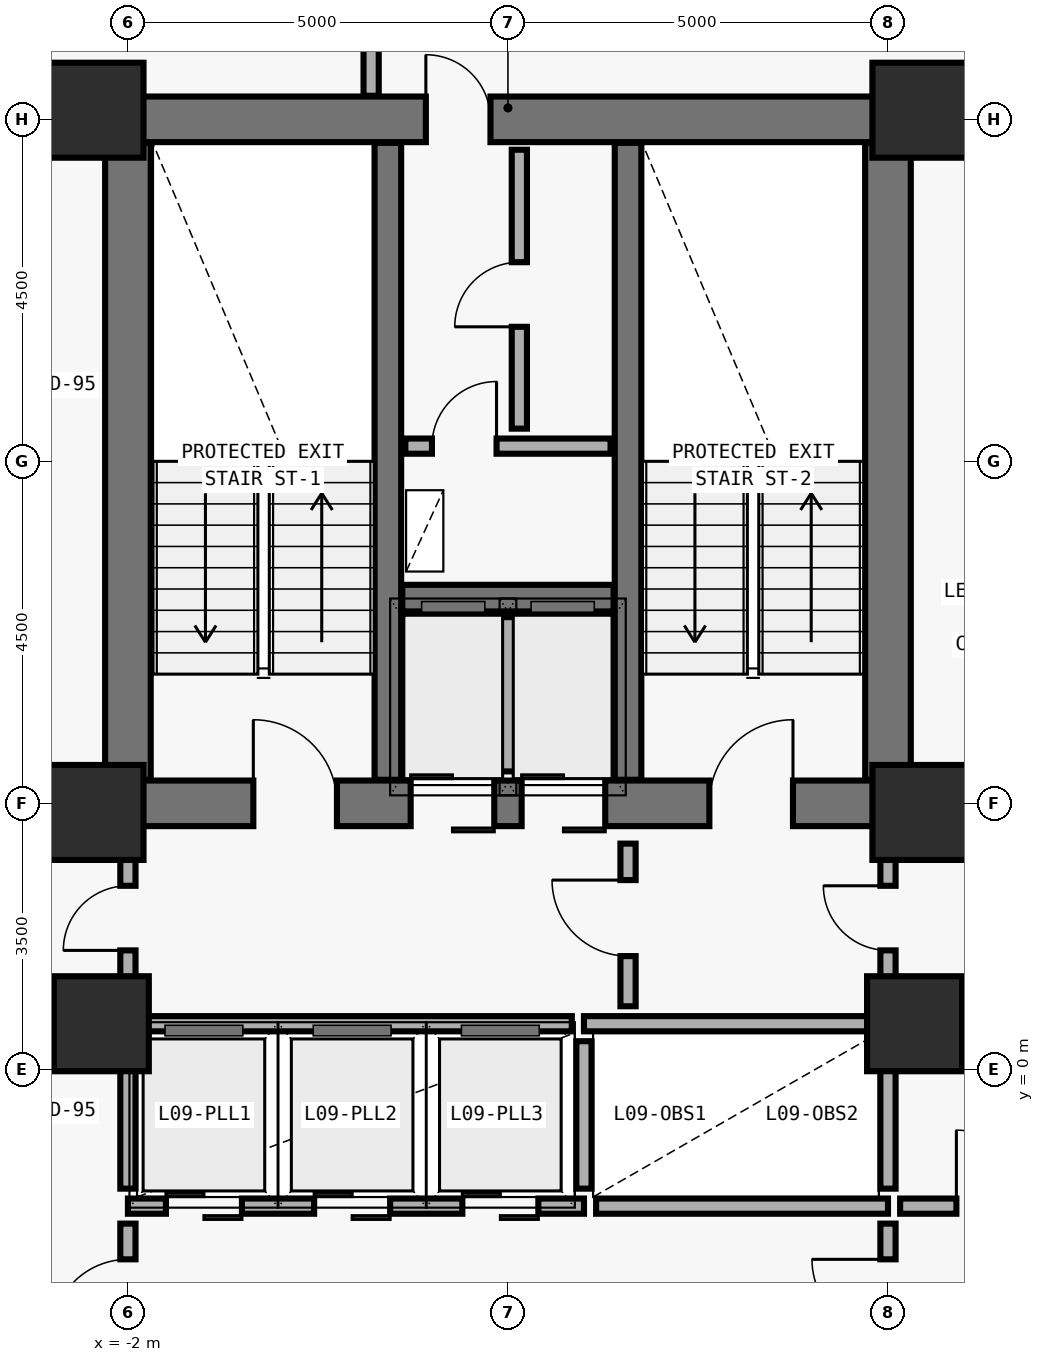
"""IFC4 building model, lengths in metres.
Left out: names, types, materials, properties, quantities, classifications, styles, units other than length and angle.
Written with IfcOpenShell. Run it as: python <this file> out.ifc"""

import sys

from ifc_helpers import new_model, si_unit, direction, frame, frame_2d, origin, origin_2d, place, context, subcontext, project, spatial, rectangle, extrude, element, fill, save


model = new_model("IFC4")
c1 = context("Model", 3, precision=1e-05, world=origin(), true_north=direction((0.0, 1.0)))
c2 = subcontext(c1, "Body", "Model", "MODEL_VIEW")
j1 = project(units=[si_unit("LENGTHUNIT", "METRE"), si_unit("PLANEANGLEUNIT", "RADIAN")], contexts=[c1])
p1 = place(None, origin())
s1 = spatial("IfcSite", under=j1, at=p1, CompositionType="ELEMENT")
p2 = place(p1, origin())
s2 = spatial("IfcBuilding", under=s1, at=p2, CompositionType="ELEMENT")
p3 = place(p2, frame((0.0, 0.0, 39.3)))
s3 = spatial("IfcBuildingStorey", under=s2, at=p3, CompositionType="ELEMENT", Elevation=39.3)
p4 = place(p3, frame((-2.0, 3.5, 0.0), z_axis=(0.0, 0.0, 1.0), x_axis=(1.0, 0.0, 0.0)))
e1 = element("IfcWall", 1, at=p4, inside=s3, PredefinedType="SHEAR", context=c2, shape_type="SweptSolid", body=[
    extrude(rectangle(XDim=10.0, YDim=0.6, at=frame_2d((5.0, 0.0))), origin(), (0.0, 0.0, 1.0), 3.892),
])
p5 = place(p4, frame((1.65, 0.0, 0.0)))
e2 = element("IfcOpeningElement", 2, at=p5, cuts=e1, PredefinedType="OPENING", context=c2, shape_type="SweptSolid", body=[
    extrude(rectangle(XDim=1.1, YDim=2.15, at=frame_2d((0.55, 1.075))), frame((0.0, 0.31, 0.0), z_axis=(0.0, -1.0, 0.0), x_axis=(1.0, 0.0, 0.0)), (0.0, 0.0, 1.0), 0.62),
])
p6 = place(p4, frame((7.65, 0.0, 0.0)))
e3 = element("IfcOpeningElement", 3, at=p6, cuts=e1, PredefinedType="OPENING", context=c2, shape_type="SweptSolid", body=[
    extrude(rectangle(XDim=1.1, YDim=2.15, at=frame_2d((0.55, 1.075))), frame((0.0, 0.31, 0.0), z_axis=(0.0, -1.0, 0.0), x_axis=(1.0, 0.0, 0.0)), (0.0, 0.0, 1.0), 0.62),
])
p7 = place(p4, frame((3.72, 0.0, 0.0)))
e4 = element("IfcOpeningElement", 4, at=p7, cuts=e1, PredefinedType="OPENING", context=c2, shape_type="SweptSolid", body=[
    extrude(rectangle(XDim=1.1, YDim=2.2, at=frame_2d((0.55, 1.1))), frame((0.0, 0.31, 0.0), z_axis=(0.0, -1.0, 0.0), x_axis=(1.0, 0.0, 0.0)), (0.0, 0.0, 1.0), 0.62),
])
p8 = place(p4, frame((5.18, 0.0, 0.0)))
e5 = element("IfcOpeningElement", 5, at=p8, cuts=e1, PredefinedType="OPENING", context=c2, shape_type="SweptSolid", body=[
    extrude(rectangle(XDim=1.1, YDim=2.2, at=frame_2d((0.55, 1.1))), frame((0.0, 0.31, 0.0), z_axis=(0.0, -1.0, 0.0), x_axis=(1.0, 0.0, 0.0)), (0.0, 0.0, 1.0), 0.62),
])
p9 = place(p3, frame((-2.0, 12.5, 0.0), z_axis=(0.0, 0.0, 1.0), x_axis=(1.0, 0.0, 0.0)))
e6 = element("IfcWall", 6, at=p9, inside=s3, PredefinedType="SHEAR", context=c2, shape_type="SweptSolid", body=[
    extrude(rectangle(XDim=10.0, YDim=0.6, at=frame_2d((5.0, 0.0))), origin(), (0.0, 0.0, 1.0), 3.892),
])
p10 = place(p9, frame((3.92, 0.0, 0.0)))
e7 = element("IfcOpeningElement", 7, at=p10, cuts=e6, PredefinedType="OPENING", context=c2, shape_type="SweptSolid", body=[
    extrude(rectangle(XDim=0.85, YDim=2.1, at=frame_2d((0.425, 1.05))), frame((0.0, 0.31, 0.0), z_axis=(0.0, -1.0, 0.0), x_axis=(1.0, 0.0, 0.0)), (0.0, 0.0, 1.0), 0.62),
])
for number, where, z_axis, x_axis in (
    (8, (-2.0, 3.81, 0.0), (0.0, 0.0, 1.0), (0.0, 1.0, 0.0)),
    (9, (8.0, 3.81, 0.0), (0.0, 0.0, 1.0), (0.0, 1.0, 0.0)),
):
    element("IfcWall", number, at=place(p3, frame(where, z_axis=z_axis, x_axis=x_axis)), inside=s3, PredefinedType="SHEAR", context=c2, shape_type="SweptSolid", body=[
        extrude(rectangle(XDim=8.38, YDim=0.6, at=frame_2d((4.19, 0.0))), origin(), (0.0, 0.0, 1.0), 3.892),
    ])
for number, where, z_axis, x_axis in (
    (10, (1.42, 3.81, 0.0), (0.0, 0.0, 1.0), (0.0, 1.0, 0.0)),
    (11, (4.58, 3.81, 0.0), (0.0, 0.0, 1.0), (0.0, 1.0, 0.0)),
):
    element("IfcWall", number, at=place(p3, frame(where, z_axis=z_axis, x_axis=x_axis)), inside=s3, PredefinedType="SHEAR", context=c2, shape_type="SweptSolid", body=[
        extrude(rectangle(XDim=8.38, YDim=0.35, at=frame_2d((4.19, 0.0))), origin(), (0.0, 0.0, 1.0), 3.892),
    ])
p11 = place(p3, frame((1.61, 6.2, 0.0), z_axis=(0.0, 0.0, 1.0), x_axis=(1.0, 0.0, 0.0)))
e12 = element("IfcWall", 12, at=p11, inside=s3, PredefinedType="SHEAR", context=c2, shape_type="SweptSolid", body=[
    extrude(rectangle(XDim=2.78, YDim=0.35, at=frame_2d((1.39, 0.0))), origin(), (0.0, 0.0, 1.0), 3.892),
])
for number, where, z_axis, x_axis in (
    (13, (-2.42, 12.62, 0.0), (0.0, 0.0, 1.0), (1.0, 0.0, 0.0)),
    (14, (8.42, 12.62, 0.0), (0.0, 0.0, 1.0), (1.0, 0.0, 0.0)),
    (15, (-2.42, 3.38, 0.0), (0.0, 0.0, 1.0), (1.0, 0.0, 0.0)),
    (16, (8.42, 3.38, 0.0), (0.0, 0.0, 1.0), (1.0, 0.0, 0.0)),
    (17, (-2.35, 0.6, 0.0), (0.0, 0.0, 1.0), (1.0, 0.0, 0.0)),
    (18, (8.35, 0.6, 0.0), (0.0, 0.0, 1.0), (1.0, 0.0, 0.0)),
):
    element("IfcColumn", number, at=place(p3, frame(where, z_axis=z_axis, x_axis=x_axis)), inside=s3, PredefinedType="COLUMN", context=c2, shape_type="SweptSolid", body=[
        extrude(rectangle(XDim=1.25, YDim=1.25, at=origin_2d()), origin(), (0.0, 0.0, 1.0), 3.875),
    ])
p12 = place(p3, frame((3.0, 3.92, 0.0), z_axis=(0.0, 0.0, 1.0), x_axis=(0.0, 1.0, 0.0)))
e19 = element("IfcWall", 19, at=p12, inside=s3, PredefinedType="SOLIDWALL", context=c2, shape_type="SweptSolid", body=[
    extrude(rectangle(XDim=2.03, YDim=0.2, at=frame_2d((1.015, 0.0))), origin(), (0.0, 0.0, 1.0), 3.64),
])
p13 = place(p3, frame((4.0, 0.6, 0.0), z_axis=(0.0, 0.0, 1.0), x_axis=(1.0, 0.0, 0.0)))
e20 = element("IfcWall", 20, at=p13, inside=s3, PredefinedType="SOLIDWALL", context=c2, shape_type="SweptSolid", body=[
    extrude(rectangle(XDim=3.88, YDim=0.2, at=frame_2d((1.94, 0.0))), origin(), (0.0, 0.0, 1.0), 3.122),
])
p14 = place(p3, frame((-2.0, -1.8, 0.0), z_axis=(0.0, 0.0, 1.0), x_axis=(1.0, 0.0, 0.0)))
e21 = element("IfcWall", 21, at=p14, inside=s3, PredefinedType="SOLIDWALL", context=c2, shape_type="SweptSolid", body=[
    extrude(rectangle(XDim=6.0, YDim=0.2, at=frame_2d((3.0, 0.0))), origin(), (0.0, 0.0, 1.0), 3.64),
])
p15 = place(p14, frame((0.5, 0.0, 0.0)))
e22 = element("IfcOpeningElement", 22, at=p15, cuts=e21, PredefinedType="OPENING", context=c2, shape_type="SweptSolid", body=[
    extrude(rectangle(XDim=1.0, YDim=2.2, at=frame_2d((0.5, 1.1))), frame((0.0, 0.11, 0.0), z_axis=(0.0, -1.0, 0.0), x_axis=(1.0, 0.0, 0.0)), (0.0, 0.0, 1.0), 0.22),
])
p16 = place(p14, frame((2.45, 0.0, 0.0)))
e23 = element("IfcOpeningElement", 23, at=p16, cuts=e21, PredefinedType="OPENING", context=c2, shape_type="SweptSolid", body=[
    extrude(rectangle(XDim=1.0, YDim=2.2, at=frame_2d((0.5, 1.1))), frame((0.0, 0.11, 0.0), z_axis=(0.0, -1.0, 0.0), x_axis=(1.0, 0.0, 0.0)), (0.0, 0.0, 1.0), 0.22),
])
p17 = place(p14, frame((4.4, 0.0, 0.0)))
e24 = element("IfcOpeningElement", 24, at=p17, cuts=e21, PredefinedType="OPENING", context=c2, shape_type="SweptSolid", body=[
    extrude(rectangle(XDim=1.0, YDim=2.2, at=frame_2d((0.5, 1.1))), frame((0.0, 0.11, 0.0), z_axis=(0.0, -1.0, 0.0), x_axis=(1.0, 0.0, 0.0)), (0.0, 0.0, 1.0), 0.22),
])
p18 = place(p3, frame((-2.0, -1.57, 0.0), z_axis=(0.0, 0.0, 1.0), x_axis=(0.0, 1.0, 0.0)))
e25 = element("IfcWall", 25, at=p18, inside=s3, PredefinedType="SOLIDWALL", context=c2, shape_type="SweptSolid", body=[
    extrude(rectangle(XDim=2.05, YDim=0.2, at=frame_2d((1.025, 0.0))), origin(), (0.0, 0.0, 1.0), 3.022),
])
p19 = place(p3, frame((4.16, -1.8, 0.0), z_axis=(0.0, 0.0, 1.0), x_axis=(1.0, 0.0, 0.0)))
e26 = element("IfcWall", 26, at=p19, inside=s3, PredefinedType="SOLIDWALL", context=c2, shape_type="SweptSolid", body=[
    extrude(rectangle(XDim=3.84, YDim=0.2, at=frame_2d((1.92, 0.0))), origin(), (0.0, 0.0, 1.0), 3.64),
])
p20 = place(p3, frame((4.0, -1.57, 0.0), z_axis=(0.0, 0.0, 1.0), x_axis=(0.0, 1.0, 0.0)))
e27 = element("IfcWall", 27, at=p20, inside=s3, PredefinedType="SOLIDWALL", context=c2, shape_type="SweptSolid", body=[
    extrude(rectangle(XDim=1.94, YDim=0.2, at=frame_2d((0.97, 0.0))), origin(), (0.0, 0.0, 1.0), 3.64),
])
p21 = place(p3, frame((8.0, -1.57, 0.0), z_axis=(0.0, 0.0, 1.0), x_axis=(0.0, 1.0, 0.0)))
e28 = element("IfcWall", 28, at=p21, inside=s3, PredefinedType="SOLIDWALL", context=c2, shape_type="SweptSolid", body=[
    extrude(rectangle(XDim=2.05, YDim=0.2, at=frame_2d((1.025, 0.0))), origin(), (0.0, 0.0, 1.0), 3.072),
])
p22 = place(p3, frame((1.65, 8.2, 0.0), z_axis=(0.0, 0.0, 1.0), x_axis=(1.0, 0.0, 0.0)))
e29 = element("IfcWall", 29, at=p22, inside=s3, PredefinedType="MOVABLE", context=c2, shape_type="SweptSolid", body=[
    extrude(rectangle(XDim=2.7, YDim=0.2, at=frame_2d((1.35, 0.0))), origin(), (0.0, 0.0, 1.0), 3.64),
])
p23 = place(p22, frame((0.35, 0.0, 0.0)))
e30 = element("IfcOpeningElement", 30, at=p23, cuts=e29, PredefinedType="OPENING", context=c2, shape_type="SweptSolid", body=[
    extrude(rectangle(XDim=0.85, YDim=2.1, at=frame_2d((0.425, 1.05))), frame((0.0, 0.11, 0.0), z_axis=(0.0, -1.0, 0.0), x_axis=(1.0, 0.0, 0.0)), (0.0, 0.0, 1.0), 0.22),
])
p24 = place(p3, frame((3.15, 8.43, 0.0), z_axis=(0.0, 0.0, 1.0), x_axis=(0.0, 1.0, 0.0)))
e31 = element("IfcWall", 31, at=p24, inside=s3, PredefinedType="MOVABLE", context=c2, shape_type="SweptSolid", body=[
    extrude(rectangle(XDim=3.67, YDim=0.2, at=frame_2d((1.835, 0.0))), origin(), (0.0, 0.0, 1.0), 3.64),
])
p25 = place(p24, frame((1.34, 0.0, 0.0)))
e32 = element("IfcOpeningElement", 32, at=p25, cuts=e31, PredefinedType="OPENING", context=c2, shape_type="SweptSolid", body=[
    extrude(rectangle(XDim=0.85, YDim=2.1, at=frame_2d((0.425, 1.05))), frame((0.0, 0.11, 0.0), z_axis=(0.0, -1.0, 0.0), x_axis=(1.0, 0.0, 0.0)), (0.0, 0.0, 1.0), 0.22),
])
p26 = place(p3, frame((4.58, 0.83, 0.0), z_axis=(0.0, 0.0, 1.0), x_axis=(0.0, 1.0, 0.0)))
e33 = element("IfcWall", 33, at=p26, inside=s3, PredefinedType="MOVABLE", context=c2, shape_type="SweptSolid", body=[
    extrude(rectangle(XDim=2.14, YDim=0.2, at=frame_2d((1.07, 0.0))), origin(), (0.0, 0.0, 1.0), 3.64),
])
p27 = place(p26, frame((0.66, 0.0, 0.0)))
e34 = element("IfcOpeningElement", 34, at=p27, cuts=e33, PredefinedType="OPENING", context=c2, shape_type="SweptSolid", body=[
    extrude(rectangle(XDim=1.0, YDim=2.1, at=frame_2d((0.5, 1.05))), frame((0.0, 0.11, 0.0), z_axis=(0.0, -1.0, 0.0), x_axis=(1.0, 0.0, 0.0)), (0.0, 0.0, 1.0), 0.22),
])
p28 = place(p3, frame((-2.0, 0.72, 0.0), z_axis=(0.0, 0.0, 1.0), x_axis=(0.0, 1.0, 0.0)))
e35 = element("IfcWall", 35, at=p28, inside=s3, PredefinedType="MOVABLE", context=c2, shape_type="SweptSolid", body=[
    extrude(rectangle(XDim=2.25, YDim=0.2, at=frame_2d((1.125, 0.0))), origin(), (0.0, 0.0, 1.0), 2.872),
])
p29 = place(p28, frame((0.845, 0.0, 0.0)))
e36 = element("IfcOpeningElement", 36, at=p29, cuts=e35, PredefinedType="OPENING", context=c2, shape_type="SweptSolid", body=[
    extrude(rectangle(XDim=0.85, YDim=2.1, at=frame_2d((0.425, 1.05))), frame((0.0, 0.11, 0.0), z_axis=(0.0, -1.0, 0.0), x_axis=(1.0, 0.0, 0.0)), (0.0, 0.0, 1.0), 0.22),
])
p30 = place(p3, frame((8.0, 0.72, 0.0), z_axis=(0.0, 0.0, 1.0), x_axis=(0.0, 1.0, 0.0)))
e37 = element("IfcWall", 37, at=p30, inside=s3, PredefinedType="MOVABLE", context=c2, shape_type="SweptSolid", body=[
    extrude(rectangle(XDim=2.25, YDim=0.2, at=frame_2d((1.125, 0.0))), origin(), (0.0, 0.0, 1.0), 2.872),
])
p31 = place(p30, frame((0.845, 0.0, 0.0)))
e38 = element("IfcOpeningElement", 38, at=p31, cuts=e37, PredefinedType="OPENING", context=c2, shape_type="SweptSolid", body=[
    extrude(rectangle(XDim=0.85, YDim=2.1, at=frame_2d((0.425, 1.05))), frame((0.0, 0.11, 0.0), z_axis=(0.0, -1.0, 0.0), x_axis=(1.0, 0.0, 0.0)), (0.0, 0.0, 1.0), 0.22),
])
p32 = place(p3, frame((-2.0, -3.97, 0.0), z_axis=(0.0, 0.0, 1.0), x_axis=(0.0, 1.0, 0.0)))
e39 = element("IfcWall", 39, at=p32, inside=s3, PredefinedType="MOVABLE", context=c2, shape_type="SweptSolid", body=[
    extrude(rectangle(XDim=1.94, YDim=0.2, at=frame_2d((0.97, 0.0))), origin(), (0.0, 0.0, 1.0), 3.022),
])
p33 = place(p32, frame((0.47, 0.0, 0.0)))
e40 = element("IfcOpeningElement", 40, at=p33, cuts=e39, PredefinedType="OPENING", context=c2, shape_type="SweptSolid", body=[
    extrude(rectangle(XDim=1.0, YDim=2.1, at=frame_2d((0.5, 1.05))), frame((0.0, 0.11, 0.0), z_axis=(0.0, -1.0, 0.0), x_axis=(1.0, 0.0, 0.0)), (0.0, 0.0, 1.0), 0.22),
])
p34 = place(p3, frame((8.0, -3.97, 0.0), z_axis=(0.0, 0.0, 1.0), x_axis=(0.0, 1.0, 0.0)))
e41 = element("IfcWall", 41, at=p34, inside=s3, PredefinedType="MOVABLE", context=c2, shape_type="SweptSolid", body=[
    extrude(rectangle(XDim=1.94, YDim=0.2, at=frame_2d((0.97, 0.0))), origin(), (0.0, 0.0, 1.0), 3.072),
])
p35 = place(p34, frame((0.47, 0.0, 0.0)))
e42 = element("IfcOpeningElement", 42, at=p35, cuts=e41, PredefinedType="OPENING", context=c2, shape_type="SweptSolid", body=[
    extrude(rectangle(XDim=1.0, YDim=2.1, at=frame_2d((0.5, 1.05))), frame((0.0, 0.11, 0.0), z_axis=(0.0, -1.0, 0.0), x_axis=(1.0, 0.0, 0.0)), (0.0, 0.0, 1.0), 0.22),
])
p36 = place(p3, frame((8.16, -1.8, 0.0), z_axis=(0.0, 0.0, 1.0), x_axis=(1.0, 0.0, 0.0)))
e43 = element("IfcWall", 43, at=p36, inside=s3, PredefinedType="MOVABLE", context=c2, shape_type="SweptSolid", body=[
    extrude(rectangle(XDim=2.64, YDim=0.2, at=frame_2d((1.32, 0.0))), origin(), (0.0, 0.0, 1.0), 3.64),
])
p37 = place(p36, frame((0.74, 0.0, 0.0)))
e44 = element("IfcOpeningElement", 44, at=p37, cuts=e43, PredefinedType="OPENING", context=c2, shape_type="SweptSolid", body=[
    extrude(rectangle(XDim=1.0, YDim=2.1, at=frame_2d((0.5, 1.05))), frame((0.0, 0.11, 0.0), z_axis=(0.0, -1.0, 0.0), x_axis=(1.0, 0.0, 0.0)), (0.0, 0.0, 1.0), 0.22),
])
p38 = place(p3, frame((-1.88, 0.6, 0.0), z_axis=(0.0, 0.0, 1.0), x_axis=(1.0, 0.0, 0.0)))
e45 = element("IfcWall", 45, at=p38, inside=s3, PredefinedType="MOVABLE", context=c2, shape_type="SweptSolid", body=[
    extrude(rectangle(XDim=5.72, YDim=0.2, at=frame_2d((2.86, 0.0))), origin(), (0.0, 0.0, 1.0), 3.122),
])
p39 = place(p3, frame((1.2, 14.7, 0.0), z_axis=(0.0, 0.0, 1.0), x_axis=(0.0, -1.0, 0.0)))
e46 = element("IfcWall", 46, at=p39, inside=s3, PredefinedType="MOVABLE", context=c2, shape_type="SweptSolid", body=[
    extrude(rectangle(XDim=1.89, YDim=0.2, at=frame_2d((0.945, 0.0))), origin(), (0.0, 0.0, 1.0), 3.64),
])
p40 = place(p5, origin())
e47 = element("IfcDoor", 47, at=p40, inside=s3, OperationType="SINGLE_SWING_LEFT", PredefinedType="DOOR", context=c2, shape_type="SweptSolid", body=[
    extrude(rectangle(XDim=1.1, YDim=2.15, at=frame_2d((0.55, 1.075))), frame((0.0, 0.025, 0.0), z_axis=(0.0, -1.0, 0.0), x_axis=(1.0, 0.0, 0.0)), (0.0, 0.0, 1.0), 0.05),
])
fill(e2, e47)
p41 = place(p6, origin())
e48 = element("IfcDoor", 48, at=p41, inside=s3, OperationType="SINGLE_SWING_RIGHT", PredefinedType="DOOR", context=c2, shape_type="SweptSolid", body=[
    extrude(rectangle(XDim=1.1, YDim=2.15, at=frame_2d((0.55, 1.075))), frame((0.0, 0.025, 0.0), z_axis=(0.0, -1.0, 0.0), x_axis=(1.0, 0.0, 0.0)), (0.0, 0.0, 1.0), 0.05),
])
fill(e3, e48)
p42 = place(p7, origin())
e49 = element("IfcDoor", 49, at=p42, inside=s3, OperationType="DOUBLE_DOOR_SLIDING", PredefinedType="DOOR", context=c2, shape_type="SweptSolid", body=[
    extrude(rectangle(XDim=1.1, YDim=2.2, at=frame_2d((0.55, 1.1))), frame((0.0, 0.025, 0.0), z_axis=(0.0, -1.0, 0.0), x_axis=(1.0, 0.0, 0.0)), (0.0, 0.0, 1.0), 0.05),
])
fill(e4, e49)
p43 = place(p8, origin())
e50 = element("IfcDoor", 50, at=p43, inside=s3, OperationType="DOUBLE_DOOR_SLIDING", PredefinedType="DOOR", context=c2, shape_type="SweptSolid", body=[
    extrude(rectangle(XDim=1.1, YDim=2.2, at=frame_2d((0.55, 1.1))), frame((0.0, 0.025, 0.0), z_axis=(0.0, -1.0, 0.0), x_axis=(1.0, 0.0, 0.0)), (0.0, 0.0, 1.0), 0.05),
])
fill(e5, e50)
p44 = place(p10, origin())
e51 = element("IfcDoor", 51, at=p44, inside=s3, OperationType="SINGLE_SWING_LEFT", PredefinedType="DOOR", context=c2, shape_type="SweptSolid", body=[
    extrude(rectangle(XDim=0.85, YDim=2.1, at=frame_2d((0.425, 1.05))), frame((0.0, 0.025, 0.0), z_axis=(0.0, -1.0, 0.0), x_axis=(1.0, 0.0, 0.0)), (0.0, 0.0, 1.0), 0.05),
])
fill(e7, e51)
p45 = place(p23, origin())
e52 = element("IfcDoor", 52, at=p45, inside=s3, OperationType="SINGLE_SWING_RIGHT", PredefinedType="DOOR", context=c2, shape_type="SweptSolid", body=[
    extrude(rectangle(XDim=0.85, YDim=2.1, at=frame_2d((0.425, 1.05))), frame((0.0, 0.025, 0.0), z_axis=(0.0, -1.0, 0.0), x_axis=(1.0, 0.0, 0.0)), (0.0, 0.0, 1.0), 0.05),
])
fill(e30, e52)
p46 = place(p25, origin())
e53 = element("IfcDoor", 53, at=p46, inside=s3, OperationType="SINGLE_SWING_LEFT", PredefinedType="DOOR", context=c2, shape_type="SweptSolid", body=[
    extrude(rectangle(XDim=0.85, YDim=2.1, at=frame_2d((0.425, 1.05))), frame((0.0, 0.025, 0.0), z_axis=(0.0, -1.0, 0.0), x_axis=(1.0, 0.0, 0.0)), (0.0, 0.0, 1.0), 0.05),
])
fill(e32, e53)
p47 = place(p27, origin())
e54 = element("IfcDoor", 54, at=p47, inside=s3, OperationType="SINGLE_SWING_RIGHT", PredefinedType="DOOR", context=c2, shape_type="SweptSolid", body=[
    extrude(rectangle(XDim=1.0, YDim=2.1, at=frame_2d((0.5, 1.05))), frame((0.0, 0.025, 0.0), z_axis=(0.0, -1.0, 0.0), x_axis=(1.0, 0.0, 0.0)), (0.0, 0.0, 1.0), 0.05),
])
fill(e34, e54)
p48 = place(p29, origin())
e55 = element("IfcDoor", 55, at=p48, inside=s3, OperationType="SINGLE_SWING_LEFT", PredefinedType="DOOR", context=c2, shape_type="SweptSolid", body=[
    extrude(rectangle(XDim=0.85, YDim=2.1, at=frame_2d((0.425, 1.05))), frame((0.0, 0.025, 0.0), z_axis=(0.0, -1.0, 0.0), x_axis=(1.0, 0.0, 0.0)), (0.0, 0.0, 1.0), 0.05),
])
fill(e36, e55)
p49 = place(p31, origin())
e56 = element("IfcDoor", 56, at=p49, inside=s3, OperationType="SINGLE_SWING_RIGHT", PredefinedType="DOOR", context=c2, shape_type="SweptSolid", body=[
    extrude(rectangle(XDim=0.85, YDim=2.1, at=frame_2d((0.425, 1.05))), frame((0.0, 0.025, 0.0), z_axis=(0.0, -1.0, 0.0), x_axis=(1.0, 0.0, 0.0)), (0.0, 0.0, 1.0), 0.05),
])
fill(e38, e56)
p50 = place(p33, origin())
e57 = element("IfcDoor", 57, at=p50, inside=s3, OperationType="SINGLE_SWING_LEFT", PredefinedType="DOOR", context=c2, shape_type="SweptSolid", body=[
    extrude(rectangle(XDim=1.0, YDim=2.1, at=frame_2d((0.5, 1.05))), frame((0.0, 0.025, 0.0), z_axis=(0.0, -1.0, 0.0), x_axis=(1.0, 0.0, 0.0)), (0.0, 0.0, 1.0), 0.05),
])
fill(e40, e57)
p51 = place(p35, origin())
e58 = element("IfcDoor", 58, at=p51, inside=s3, OperationType="SINGLE_SWING_RIGHT", PredefinedType="DOOR", context=c2, shape_type="SweptSolid", body=[
    extrude(rectangle(XDim=1.0, YDim=2.1, at=frame_2d((0.5, 1.05))), frame((0.0, 0.025, 0.0), z_axis=(0.0, -1.0, 0.0), x_axis=(1.0, 0.0, 0.0)), (0.0, 0.0, 1.0), 0.05),
])
fill(e42, e58)
p52 = place(p37, origin())
e59 = element("IfcDoor", 59, at=p52, inside=s3, OperationType="SINGLE_SWING_LEFT", PredefinedType="DOOR", context=c2, shape_type="SweptSolid", body=[
    extrude(rectangle(XDim=1.0, YDim=2.1, at=frame_2d((0.5, 1.05))), frame((0.0, 0.025, 0.0), z_axis=(0.0, -1.0, 0.0), x_axis=(1.0, 0.0, 0.0)), (0.0, 0.0, 1.0), 0.05),
])
fill(e44, e59)
p53 = place(p15, origin())
e60 = element("IfcDoor", 60, at=p53, inside=s3, OperationType="DOUBLE_DOOR_SLIDING", PredefinedType="DOOR", context=c2, shape_type="SweptSolid", body=[
    extrude(rectangle(XDim=1.0, YDim=2.2, at=frame_2d((0.5, 1.1))), frame((0.0, 0.025, 0.0), z_axis=(0.0, -1.0, 0.0), x_axis=(1.0, 0.0, 0.0)), (0.0, 0.0, 1.0), 0.05),
])
fill(e22, e60)
p54 = place(p16, origin())
e61 = element("IfcDoor", 61, at=p54, inside=s3, OperationType="DOUBLE_DOOR_SLIDING", PredefinedType="DOOR", context=c2, shape_type="SweptSolid", body=[
    extrude(rectangle(XDim=1.0, YDim=2.2, at=frame_2d((0.5, 1.1))), frame((0.0, 0.025, 0.0), z_axis=(0.0, -1.0, 0.0), x_axis=(1.0, 0.0, 0.0)), (0.0, 0.0, 1.0), 0.05),
])
fill(e23, e61)
p55 = place(p17, origin())
e62 = element("IfcDoor", 62, at=p55, inside=s3, OperationType="DOUBLE_DOOR_SLIDING", PredefinedType="DOOR", context=c2, shape_type="SweptSolid", body=[
    extrude(rectangle(XDim=1.0, YDim=2.2, at=frame_2d((0.5, 1.1))), frame((0.0, 0.025, 0.0), z_axis=(0.0, -1.0, 0.0), x_axis=(1.0, 0.0, 0.0)), (0.0, 0.0, 1.0), 0.05),
])
fill(e24, e62)
save(model, sys.argv[1])
